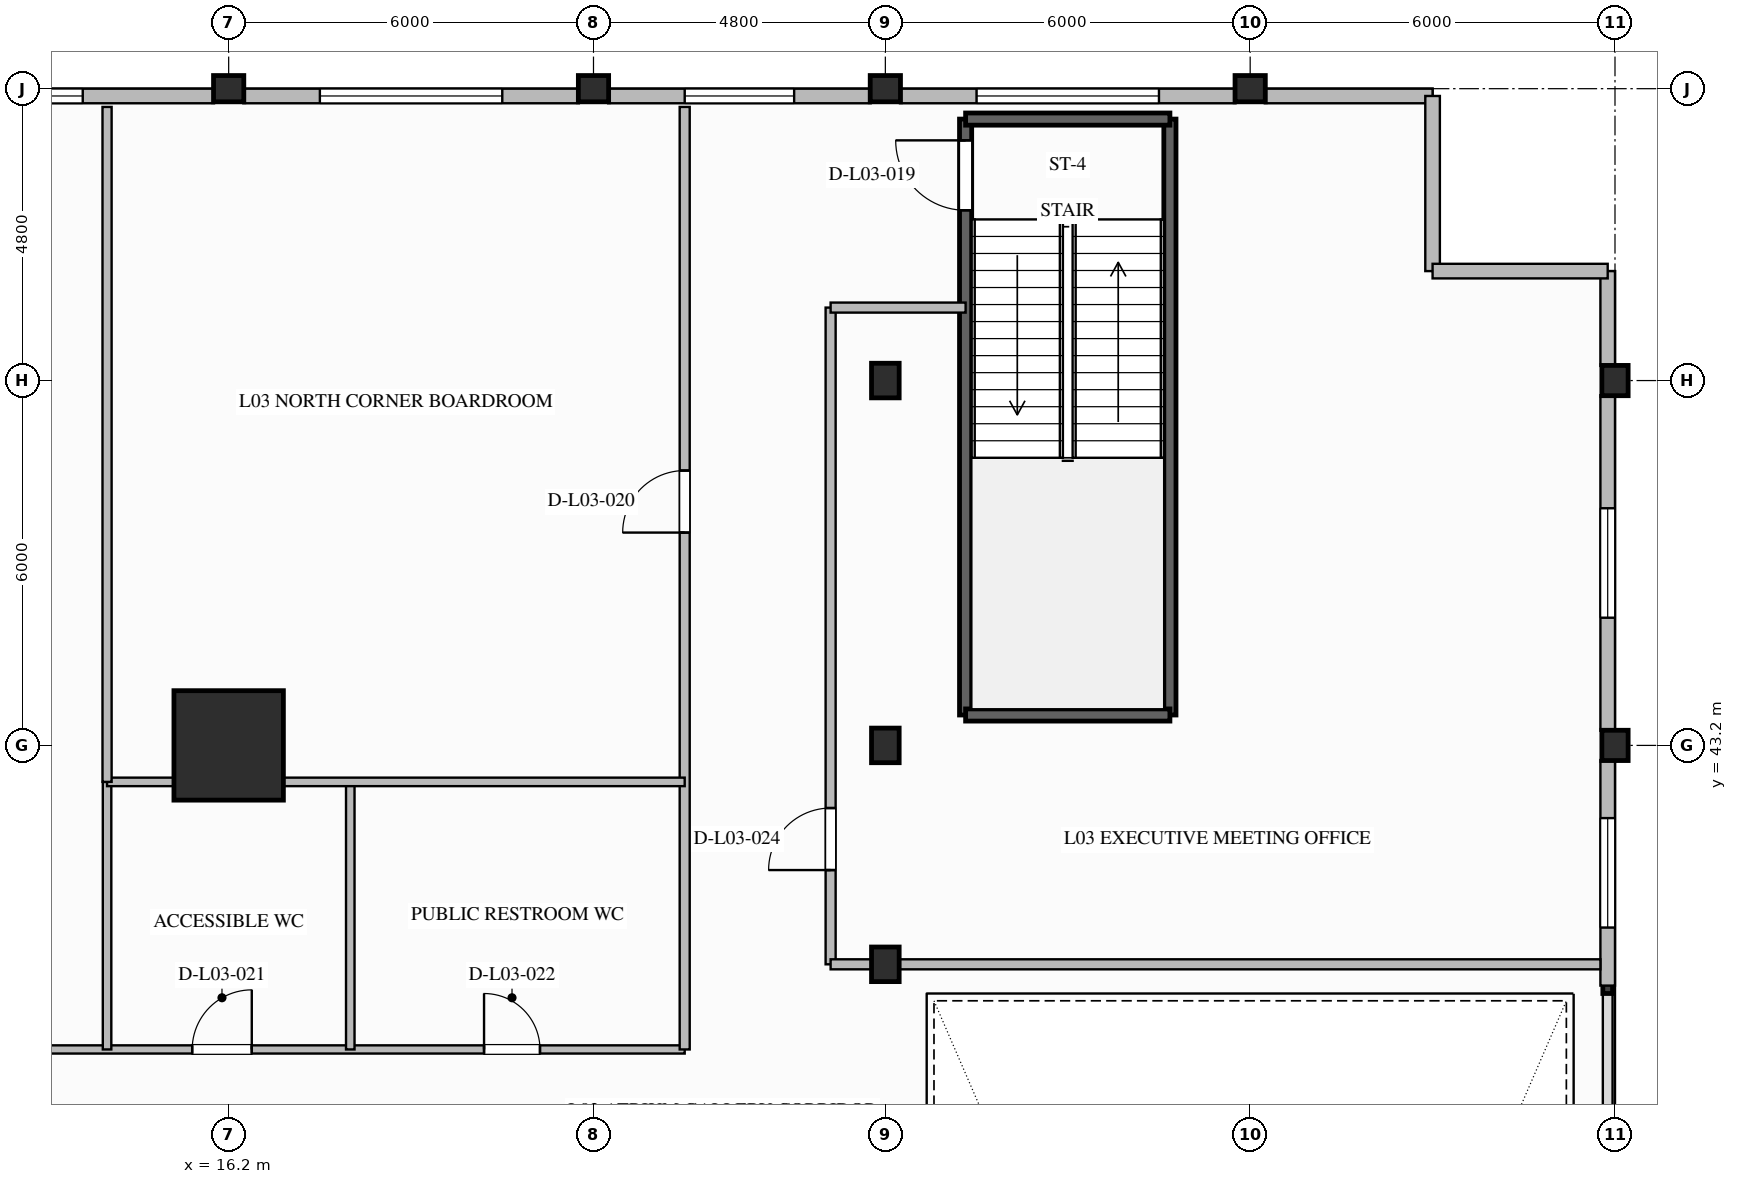
"""IFC4 building model, lengths in metres.
Left out: names, types, materials, properties, quantities, classifications, styles, units other than length and angle.
Written with IfcOpenShell. Run it as: python <this file> out.ifc"""

import sys

from ifc_helpers import new_model, si_unit, direction, frame, frame_2d, origin, origin_2d, place, context, subcontext, project, spatial, rectangle, i_section, extrude, element, fill, save


model = new_model("IFC4")
c1 = context("Model", 3, precision=1e-05, world=origin(), true_north=direction((0.0, 1.0)))
c2 = subcontext(c1, "Body", "Model", "MODEL_VIEW")
j1 = project(units=[si_unit("LENGTHUNIT", "METRE"), si_unit("PLANEANGLEUNIT", "RADIAN")], contexts=[c1])
p1 = place(None, origin())
s1 = spatial("IfcSite", under=j1, at=p1, CompositionType="ELEMENT")
p2 = place(p1, origin())
s2 = spatial("IfcBuilding", under=s1, at=p2, CompositionType="ELEMENT")
p3 = place(p2, frame((0.0, 0.0, 17.2)))
s3 = spatial("IfcBuildingStorey", under=s2, at=p3, CompositionType="ELEMENT", Elevation=17.2)
p4 = place(p3, frame((16.2, 43.2, 0.0), z_axis=(0.0, 0.0, 1.0), x_axis=(1.0, 0.0, 0.0)))
e1 = element("IfcColumn", 1, at=p4, inside=s3, PredefinedType="COLUMN", context=c2, shape_type="SweptSolid", body=[
    extrude(rectangle(XDim=1.8, YDim=1.8, at=origin_2d()), origin(), (0.0, 0.0, 1.0), 5.2),
])
for number, where, z_axis, x_axis in (
    (2, (39.0, 43.2, 0.0), (0.0, 0.0, 1.0), (1.0, 0.0, 0.0)),
    (3, (39.0, 49.2, 0.0), (0.0, 0.0, 1.0), (1.0, 0.0, 0.0)),
    (4, (16.2, 54.0, 0.0), (0.0, 0.0, 1.0), (0.0, 1.0, 0.0)),
    (5, (22.2, 54.0, 0.0), (0.0, 0.0, 1.0), (0.0, 1.0, 0.0)),
    (6, (27.0, 54.0, 0.0), (0.0, 0.0, 1.0), (0.0, 1.0, 0.0)),
    (7, (33.0, 54.0, 0.0), (0.0, 0.0, 1.0), (0.0, 1.0, 0.0)),
):
    element("IfcColumn", number, at=place(p3, frame(where, z_axis=z_axis, x_axis=x_axis)), inside=s3, PredefinedType="COLUMN", context=c2, shape_type="SweptSolid", body=[
        extrude(i_section(OverallWidth=0.432, OverallDepth=0.498, WebThickness=0.056, FlangeThickness=0.089, FilletRadius=0.03, at=origin_2d()), origin(), (0.0, 0.0, 1.0), 5.2),
    ])
for number, where, z_axis, x_axis in (
    (8, (27.0, 39.6, 0.0), (0.0, 0.0, 1.0), (1.0, 0.0, 0.0)),
    (9, (27.0, 43.2, 0.0), (0.0, 0.0, 1.0), (1.0, 0.0, 0.0)),
    (10, (27.0, 49.2, 0.0), (0.0, 0.0, 1.0), (1.0, 0.0, 0.0)),
):
    element("IfcColumn", number, at=place(p3, frame(where, z_axis=z_axis, x_axis=x_axis)), inside=s3, PredefinedType="COLUMN", context=c2, shape_type="SweptSolid", body=[
        extrude(i_section(OverallWidth=0.454, OverallDepth=0.569, WebThickness=0.078, FlangeThickness=0.125, FilletRadius=0.03, at=origin_2d()), origin(), (0.0, 0.0, 1.0), 5.2),
    ])
p5 = place(p3, frame((38.88, 42.959, 0.0), z_axis=(0.0, 0.0, 1.0), x_axis=(0.0, -1.0, 0.0)))
e11 = element("IfcWall", 11, at=p5, inside=s3, PredefinedType="STANDARD", context=c2, shape_type="SweptSolid", body=[
    extrude(rectangle(XDim=3.709, YDim=0.24, at=frame_2d((1.854, 0.0))), origin(), (0.0, 0.0, 1.0), 4.205),
])
p6 = place(p5, frame((0.955, 0.0, 0.85)))
e12 = element("IfcOpeningElement", 12, at=p6, cuts=e11, PredefinedType="OPENING", context=c2, shape_type="SweptSolid", body=[
    extrude(rectangle(XDim=1.8, YDim=2.2, at=frame_2d((0.9, 1.1))), frame((0.0, 0.13, 0.0), z_axis=(0.0, -1.0, 0.0), x_axis=(1.0, 0.0, 0.0)), (0.0, 0.0, 1.0), 0.26),
])
p7 = place(p3, frame((38.88, 48.959, 0.0), z_axis=(0.0, 0.0, 1.0), x_axis=(0.0, -1.0, 0.0)))
e13 = element("IfcWall", 13, at=p7, inside=s3, PredefinedType="STANDARD", context=c2, shape_type="SweptSolid", body=[
    extrude(rectangle(XDim=5.518, YDim=0.24, at=frame_2d((2.759, 0.0))), origin(), (0.0, 0.0, 1.0), 4.205),
])
p8 = place(p7, frame((1.859, 0.0, 0.85)))
e14 = element("IfcOpeningElement", 14, at=p8, cuts=e13, PredefinedType="OPENING", context=c2, shape_type="SweptSolid", body=[
    extrude(rectangle(XDim=1.8, YDim=2.2, at=frame_2d((0.9, 1.1))), frame((0.0, 0.13, 0.0), z_axis=(0.0, -1.0, 0.0), x_axis=(1.0, 0.0, 0.0)), (0.0, 0.0, 1.0), 0.26),
])
p9 = place(p3, frame((38.88, 51.0, 0.0), z_axis=(0.0, 0.0, 1.0), x_axis=(0.0, -1.0, 0.0)))
e15 = element("IfcWall", 15, at=p9, inside=s3, PredefinedType="STANDARD", context=c2, shape_type="SweptSolid", body=[
    extrude(rectangle(XDim=1.559, YDim=0.24, at=frame_2d((0.78, 0.0))), origin(), (0.0, 0.0, 1.0), 4.9),
])
p10 = place(p3, frame((8.641, 53.88, 0.0), z_axis=(0.0, 0.0, 1.0), x_axis=(1.0, 0.0, 0.0)))
e16 = element("IfcWall", 16, at=p10, inside=s3, PredefinedType="STANDARD", context=c2, shape_type="SweptSolid", body=[
    extrude(rectangle(XDim=7.318, YDim=0.24, at=frame_2d((3.659, 0.0))), origin(), (0.0, 0.0, 1.0), 4.205),
])
p11 = place(p10, frame((2.159, 0.0, 0.65)))
e17 = element("IfcOpeningElement", 17, at=p11, cuts=e16, PredefinedType="OPENING", context=c2, shape_type="SweptSolid", body=[
    extrude(rectangle(XDim=3.0, YDim=2.2, at=frame_2d((1.5, 1.1))), frame((0.0, 0.13, 0.0), z_axis=(0.0, -1.0, 0.0), x_axis=(1.0, 0.0, 0.0)), (0.0, 0.0, 1.0), 0.26),
])
p12 = place(p3, frame((16.441, 53.88, 0.0), z_axis=(0.0, 0.0, 1.0), x_axis=(1.0, 0.0, 0.0)))
e18 = element("IfcWall", 18, at=p12, inside=s3, PredefinedType="STANDARD", context=c2, shape_type="SweptSolid", body=[
    extrude(rectangle(XDim=5.518, YDim=0.24, at=frame_2d((2.759, 0.0))), origin(), (0.0, 0.0, 1.0), 4.205),
])
p13 = place(p12, frame((1.259, 0.0, 0.65)))
e19 = element("IfcOpeningElement", 19, at=p13, cuts=e18, PredefinedType="OPENING", context=c2, shape_type="SweptSolid", body=[
    extrude(rectangle(XDim=3.0, YDim=2.2, at=frame_2d((1.5, 1.1))), frame((0.0, 0.13, 0.0), z_axis=(0.0, -1.0, 0.0), x_axis=(1.0, 0.0, 0.0)), (0.0, 0.0, 1.0), 0.26),
])
p14 = place(p3, frame((22.441, 53.88, 0.0), z_axis=(0.0, 0.0, 1.0), x_axis=(1.0, 0.0, 0.0)))
e20 = element("IfcWall", 20, at=p14, inside=s3, PredefinedType="STANDARD", context=c2, shape_type="SweptSolid", body=[
    extrude(rectangle(XDim=4.318, YDim=0.24, at=frame_2d((2.159, 0.0))), origin(), (0.0, 0.0, 1.0), 4.205),
])
p15 = place(p14, frame((1.259, 0.0, 0.65)))
e21 = element("IfcOpeningElement", 21, at=p15, cuts=e20, PredefinedType="OPENING", context=c2, shape_type="SweptSolid", body=[
    extrude(rectangle(XDim=1.8, YDim=2.2, at=frame_2d((0.9, 1.1))), frame((0.0, 0.13, 0.0), z_axis=(0.0, -1.0, 0.0), x_axis=(1.0, 0.0, 0.0)), (0.0, 0.0, 1.0), 0.26),
])
p16 = place(p3, frame((27.241, 53.88, 0.0), z_axis=(0.0, 0.0, 1.0), x_axis=(1.0, 0.0, 0.0)))
e22 = element("IfcWall", 22, at=p16, inside=s3, PredefinedType="STANDARD", context=c2, shape_type="SweptSolid", body=[
    extrude(rectangle(XDim=5.518, YDim=0.24, at=frame_2d((2.759, 0.0))), origin(), (0.0, 0.0, 1.0), 4.205),
])
p17 = place(p16, frame((1.259, 0.0, 0.65)))
e23 = element("IfcOpeningElement", 23, at=p17, cuts=e22, PredefinedType="OPENING", context=c2, shape_type="SweptSolid", body=[
    extrude(rectangle(XDim=3.0, YDim=2.2, at=frame_2d((1.5, 1.1))), frame((0.0, 0.13, 0.0), z_axis=(0.0, -1.0, 0.0), x_axis=(1.0, 0.0, 0.0)), (0.0, 0.0, 1.0), 0.26),
])
p18 = place(p3, frame((33.241, 53.88, 0.0), z_axis=(0.0, 0.0, 1.0), x_axis=(1.0, 0.0, 0.0)))
e24 = element("IfcWall", 24, at=p18, inside=s3, PredefinedType="STANDARD", context=c2, shape_type="SweptSolid", body=[
    extrude(rectangle(XDim=2.759, YDim=0.24, at=frame_2d((1.379, 0.0))), origin(), (0.0, 0.0, 1.0), 4.9),
])
for number, where, z_axis, x_axis in (
    (25, (36.0, 53.88, 0.0), (0.0, 0.0, 1.0), (0.0, -1.0, 0.0)),
    (26, (36.0, 51.0, 0.0), (0.0, 0.0, 1.0), (1.0, 0.0, 0.0)),
):
    element("IfcWall", number, at=place(p3, frame(where, z_axis=z_axis, x_axis=x_axis)), inside=s3, PredefinedType="STANDARD", context=c2, shape_type="SweptSolid", body=[
        extrude(rectangle(XDim=2.88, YDim=0.24, at=frame_2d((1.44, 0.0))), origin(), (0.0, 0.0, 1.0), 4.9),
    ])
p19 = place(p3, frame((28.32, 43.7, 0.0), z_axis=(0.0, 0.0, 1.0), x_axis=(0.0, 1.0, 0.0)))
e27 = element("IfcWall", 27, at=p19, inside=s3, PredefinedType="SOLIDWALL", context=c2, shape_type="SweptSolid", body=[
    extrude(rectangle(XDim=9.8, YDim=0.2, at=frame_2d((4.9, 0.0))), origin(), (0.0, 0.0, 1.0), 4.9),
])
p20 = place(p19, frame((8.3, 0.0, 0.0)))
e28 = element("IfcOpeningElement", 28, at=p20, cuts=e27, PredefinedType="OPENING", context=c2, shape_type="SweptSolid", body=[
    extrude(rectangle(XDim=1.15, YDim=2.15, at=frame_2d((0.575, 1.075))), frame((0.0, 0.11, 0.0), z_axis=(0.0, -1.0, 0.0), x_axis=(1.0, 0.0, 0.0)), (0.0, 0.0, 1.0), 0.22),
])
p21 = place(p3, frame((31.68, 53.5, 0.0), z_axis=(0.0, 0.0, 1.0), x_axis=(0.0, -1.0, 0.0)))
e29 = element("IfcWall", 29, at=p21, inside=s3, PredefinedType="SOLIDWALL", context=c2, shape_type="SweptSolid", body=[
    extrude(rectangle(XDim=9.8, YDim=0.2, at=frame_2d((4.9, 0.0))), origin(), (0.0, 0.0, 1.0), 4.9),
])
for number, where, z_axis, x_axis in (
    (30, (28.32, 43.7, 0.0), (0.0, 0.0, 1.0), (1.0, 0.0, 0.0)),
    (31, (31.68, 53.5, 0.0), (0.0, 0.0, 1.0), (-1.0, 0.0, 0.0)),
):
    element("IfcWall", number, at=place(p3, frame(where, z_axis=z_axis, x_axis=x_axis)), inside=s3, PredefinedType="SOLIDWALL", context=c2, shape_type="SweptSolid", body=[
        extrude(rectangle(XDim=3.36, YDim=0.2, at=frame_2d((1.68, 0.0))), origin(), (0.0, 0.0, 1.0), 4.9),
    ])
p22 = place(p3, frame((-23.6, 38.2, 0.0), z_axis=(0.0, 0.0, 1.0), x_axis=(1.0, 0.0, 0.0)))
e32 = element("IfcWall", 32, at=p22, inside=s3, PredefinedType="PARTITIONING", context=c2, shape_type="SweptSolid", body=[
    extrude(rectangle(XDim=47.3, YDim=0.135, at=frame_2d((23.65, 0.0))), origin(), (0.0, 0.0, 1.0), 4.9),
])
p23 = place(p22, frame((39.2, 0.0, 0.0)))
e33 = element("IfcOpeningElement", 33, at=p23, cuts=e32, PredefinedType="OPENING", context=c2, shape_type="SweptSolid", body=[
    extrude(rectangle(XDim=0.98, YDim=2.1, at=frame_2d((0.49, 1.05))), frame((0.0, 0.077, 0.0), z_axis=(0.0, -1.0, 0.0), x_axis=(1.0, 0.0, 0.0)), (0.0, 0.0, 1.0), 0.155),
])
p24 = place(p22, frame((44.0, 0.0, 0.0)))
e34 = element("IfcOpeningElement", 34, at=p24, cuts=e32, PredefinedType="OPENING", context=c2, shape_type="SweptSolid", body=[
    extrude(rectangle(XDim=0.92, YDim=2.1, at=frame_2d((0.46, 1.05))), frame((0.0, 0.077, 0.0), z_axis=(0.0, -1.0, 0.0), x_axis=(1.0, 0.0, 0.0)), (0.0, 0.0, 1.0), 0.155),
])
p25 = place(p22, frame((10.0, 0.0, 0.0)))
e35 = element("IfcOpeningElement", 35, at=p25, cuts=e32, PredefinedType="OPENING", context=c2, shape_type="SweptSolid", body=[
    extrude(rectangle(XDim=1.8, YDim=2.35, at=frame_2d((0.9, 1.175))), frame((0.0, 0.077, 0.0), z_axis=(0.0, -1.0, 0.0), x_axis=(1.0, 0.0, 0.0)), (0.0, 0.0, 1.0), 0.155),
])
p26 = place(p22, frame((28.0, 0.0, 0.0)))
e36 = element("IfcOpeningElement", 36, at=p26, cuts=e32, PredefinedType="OPENING", context=c2, shape_type="SweptSolid", body=[
    extrude(rectangle(XDim=1.26, YDim=2.2, at=frame_2d((0.63, 1.1))), frame((0.0, 0.077, 0.0), z_axis=(0.0, -1.0, 0.0), x_axis=(1.0, 0.0, 0.0)), (0.0, 0.0, 1.0), 0.155),
])
p27 = place(p3, frame((23.7, 38.2, 0.0), z_axis=(0.0, 0.0, 1.0), x_axis=(0.0, 1.0, 0.0)))
e37 = element("IfcWall", 37, at=p27, inside=s3, PredefinedType="PARTITIONING", context=c2, shape_type="SweptSolid", body=[
    extrude(rectangle(XDim=15.5, YDim=0.165, at=frame_2d((7.75, 0.0))), origin(), (0.0, 0.0, 1.0), 4.9),
])
p28 = place(p27, frame((8.5, 0.0, 0.0)))
e38 = element("IfcOpeningElement", 38, at=p28, cuts=e37, PredefinedType="OPENING", context=c2, shape_type="SweptSolid", body=[
    extrude(rectangle(XDim=1.02, YDim=2.15, at=frame_2d((0.51, 1.075))), frame((0.0, 0.093, 0.0), z_axis=(0.0, -1.0, 0.0), x_axis=(1.0, 0.0, 0.0)), (0.0, 0.0, 1.0), 0.185),
])
p29 = place(p3, frame((26.1, 39.6, 0.0), z_axis=(0.0, 0.0, 1.0), x_axis=(0.0, 1.0, 0.0)))
e39 = element("IfcWall", 39, at=p29, inside=s3, PredefinedType="PARTITIONING", context=c2, shape_type="SweptSolid", body=[
    extrude(rectangle(XDim=10.8, YDim=0.165, at=frame_2d((5.4, 0.0))), origin(), (0.0, 0.0, 1.0), 4.9),
])
p30 = place(p29, frame((1.55, 0.0, 0.0)))
e40 = element("IfcOpeningElement", 40, at=p30, cuts=e39, PredefinedType="OPENING", context=c2, shape_type="SweptSolid", body=[
    extrude(rectangle(XDim=1.02, YDim=2.15, at=frame_2d((0.51, 1.075))), frame((0.0, 0.093, 0.0), z_axis=(0.0, -1.0, 0.0), x_axis=(1.0, 0.0, 0.0)), (0.0, 0.0, 1.0), 0.185),
])
p31 = place(p3, frame((26.1, 50.4, 0.0), z_axis=(0.0, 0.0, 1.0), x_axis=(1.0, 0.0, 0.0)))
e41 = element("IfcWall", 41, at=p31, inside=s3, PredefinedType="PARTITIONING", context=c2, shape_type="SweptSolid", body=[
    extrude(rectangle(XDim=2.22, YDim=0.165, at=frame_2d((1.11, 0.0))), origin(), (0.0, 0.0, 1.0), 4.9),
])
p32 = place(p3, frame((26.1, 39.6, 0.0), z_axis=(0.0, 0.0, 1.0), x_axis=(1.0, 0.0, 0.0)))
e42 = element("IfcWall", 42, at=p32, inside=s3, PredefinedType="PARTITIONING", context=c2, shape_type="SweptSolid", body=[
    extrude(rectangle(XDim=12.66, YDim=0.165, at=frame_2d((6.33, 0.0))), origin(), (0.0, 0.0, 1.0), 4.425),
])
for number, where, z_axis, x_axis in (
    (43, (14.2, 38.2, 0.0), (0.0, 0.0, 1.0), (0.0, 1.0, 0.0)),
    (44, (18.2, 38.2, 0.0), (0.0, 0.0, 1.0), (0.0, 1.0, 0.0)),
):
    element("IfcWall", number, at=place(p3, frame(where, z_axis=z_axis, x_axis=x_axis)), inside=s3, PredefinedType="PLUMBINGWALL", context=c2, shape_type="SweptSolid", body=[
        extrude(rectangle(XDim=4.4, YDim=0.14, at=frame_2d((2.2, 0.0))), origin(), (0.0, 0.0, 1.0), 4.9),
    ])
p33 = place(p3, frame((14.2, 42.6, 0.0), z_axis=(0.0, 0.0, 1.0), x_axis=(1.0, 0.0, 0.0)))
e45 = element("IfcWall", 45, at=p33, inside=s3, PredefinedType="PLUMBINGWALL", context=c2, shape_type="SweptSolid", body=[
    extrude(rectangle(XDim=9.5, YDim=0.14, at=frame_2d((4.75, 0.0))), origin(), (0.0, 0.0, 1.0), 4.9),
])
p34 = place(p3, frame((14.2, 42.6, 0.0), z_axis=(0.0, 0.0, 1.0), x_axis=(0.0, 1.0, 0.0)))
e46 = element("IfcWall", 46, at=p34, inside=s3, PredefinedType="PARTITIONING", context=c2, shape_type="SweptSolid", body=[
    extrude(rectangle(XDim=11.1, YDim=0.15, at=frame_2d((5.55, 0.0))), origin(), (0.0, 0.0, 1.0), 4.9),
])
p35 = place(p6, origin())
e47 = element("IfcWindow", 47, at=p35, inside=s3, PartitioningType="SINGLE_PANEL", PredefinedType="WINDOW", context=c2, shape_type="SweptSolid", body=[
    extrude(rectangle(XDim=1.8, YDim=2.2, at=frame_2d((0.9, 1.1))), frame((0.0, 0.03, 0.0), z_axis=(0.0, -1.0, 0.0), x_axis=(1.0, 0.0, 0.0)), (0.0, 0.0, 1.0), 0.06),
])
fill(e12, e47)
p36 = place(p8, origin())
e48 = element("IfcWindow", 48, at=p36, inside=s3, PartitioningType="SINGLE_PANEL", PredefinedType="WINDOW", context=c2, shape_type="SweptSolid", body=[
    extrude(rectangle(XDim=1.8, YDim=2.2, at=frame_2d((0.9, 1.1))), frame((0.0, 0.03, 0.0), z_axis=(0.0, -1.0, 0.0), x_axis=(1.0, 0.0, 0.0)), (0.0, 0.0, 1.0), 0.06),
])
fill(e14, e48)
p37 = place(p11, origin())
e49 = element("IfcWindow", 49, at=p37, inside=s3, PartitioningType="SINGLE_PANEL", PredefinedType="WINDOW", context=c2, shape_type="SweptSolid", body=[
    extrude(rectangle(XDim=3.0, YDim=2.2, at=frame_2d((1.5, 1.1))), frame((0.0, 0.03, 0.0), z_axis=(0.0, -1.0, 0.0), x_axis=(1.0, 0.0, 0.0)), (0.0, 0.0, 1.0), 0.06),
])
fill(e17, e49)
p38 = place(p13, origin())
e50 = element("IfcWindow", 50, at=p38, inside=s3, PartitioningType="SINGLE_PANEL", PredefinedType="WINDOW", context=c2, shape_type="SweptSolid", body=[
    extrude(rectangle(XDim=3.0, YDim=2.2, at=frame_2d((1.5, 1.1))), frame((0.0, 0.03, 0.0), z_axis=(0.0, -1.0, 0.0), x_axis=(1.0, 0.0, 0.0)), (0.0, 0.0, 1.0), 0.06),
])
fill(e19, e50)
p39 = place(p15, origin())
e51 = element("IfcWindow", 51, at=p39, inside=s3, PartitioningType="SINGLE_PANEL", PredefinedType="WINDOW", context=c2, shape_type="SweptSolid", body=[
    extrude(rectangle(XDim=1.8, YDim=2.2, at=frame_2d((0.9, 1.1))), frame((0.0, 0.03, 0.0), z_axis=(0.0, -1.0, 0.0), x_axis=(1.0, 0.0, 0.0)), (0.0, 0.0, 1.0), 0.06),
])
fill(e21, e51)
p40 = place(p17, origin())
e52 = element("IfcWindow", 52, at=p40, inside=s3, PartitioningType="SINGLE_PANEL", PredefinedType="WINDOW", context=c2, shape_type="SweptSolid", body=[
    extrude(rectangle(XDim=3.0, YDim=2.2, at=frame_2d((1.5, 1.1))), frame((0.0, 0.03, 0.0), z_axis=(0.0, -1.0, 0.0), x_axis=(1.0, 0.0, 0.0)), (0.0, 0.0, 1.0), 0.06),
])
fill(e23, e52)
p41 = place(p20, origin())
e53 = element("IfcDoor", 53, at=p41, inside=s3, OperationType="SINGLE_SWING_RIGHT", PredefinedType="DOOR", context=c2, shape_type="SweptSolid", body=[
    extrude(rectangle(XDim=1.15, YDim=2.15, at=frame_2d((0.575, 1.075))), frame((0.0, 0.025, 0.0), z_axis=(0.0, -1.0, 0.0), x_axis=(1.0, 0.0, 0.0)), (0.0, 0.0, 1.0), 0.05),
])
fill(e28, e53)
p42 = place(p28, origin())
e54 = element("IfcDoor", 54, at=p42, inside=s3, OperationType="SINGLE_SWING_LEFT", PredefinedType="DOOR", context=c2, shape_type="SweptSolid", body=[
    extrude(rectangle(XDim=1.02, YDim=2.15, at=frame_2d((0.51, 1.075))), frame((0.0, 0.025, 0.0), z_axis=(0.0, -1.0, 0.0), x_axis=(1.0, 0.0, 0.0)), (0.0, 0.0, 1.0), 0.05),
])
fill(e38, e54)
p43 = place(p23, origin())
e55 = element("IfcDoor", 55, at=p43, inside=s3, OperationType="SINGLE_SWING_RIGHT", PredefinedType="DOOR", context=c2, shape_type="SweptSolid", body=[
    extrude(rectangle(XDim=0.98, YDim=2.1, at=frame_2d((0.49, 1.05))), frame((0.0, 0.025, 0.0), z_axis=(0.0, -1.0, 0.0), x_axis=(1.0, 0.0, 0.0)), (0.0, 0.0, 1.0), 0.05),
])
fill(e33, e55)
p44 = place(p24, origin())
e56 = element("IfcDoor", 56, at=p44, inside=s3, OperationType="SINGLE_SWING_LEFT", PredefinedType="DOOR", context=c2, shape_type="SweptSolid", body=[
    extrude(rectangle(XDim=0.92, YDim=2.1, at=frame_2d((0.46, 1.05))), frame((0.0, 0.025, 0.0), z_axis=(0.0, -1.0, 0.0), x_axis=(1.0, 0.0, 0.0)), (0.0, 0.0, 1.0), 0.05),
])
fill(e34, e56)
p45 = place(p30, origin())
e57 = element("IfcDoor", 57, at=p45, inside=s3, OperationType="SINGLE_SWING_LEFT", PredefinedType="DOOR", context=c2, shape_type="SweptSolid", body=[
    extrude(rectangle(XDim=1.02, YDim=2.15, at=frame_2d((0.51, 1.075))), frame((0.0, 0.025, 0.0), z_axis=(0.0, -1.0, 0.0), x_axis=(1.0, 0.0, 0.0)), (0.0, 0.0, 1.0), 0.05),
])
fill(e40, e57)
save(model, sys.argv[1])
